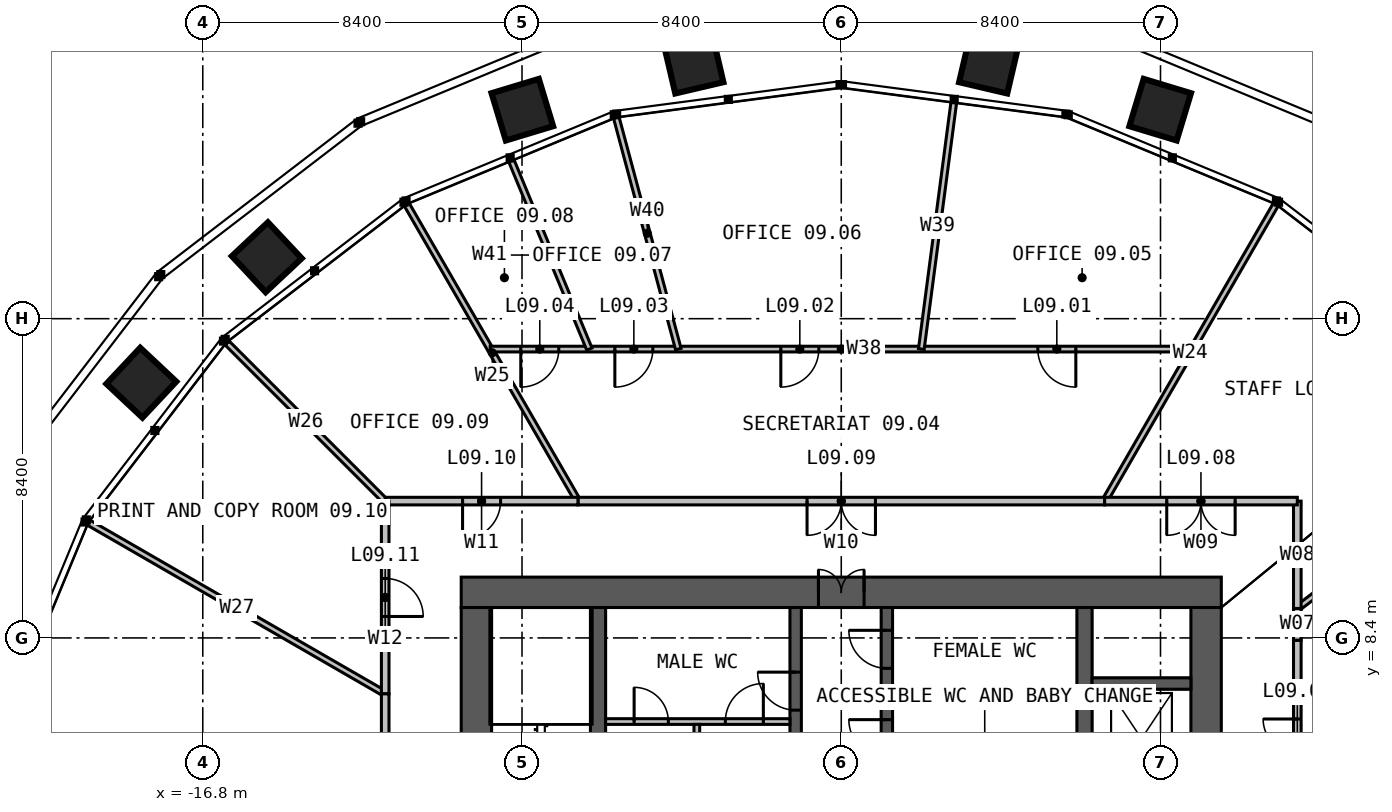
"""IFC4 building model, lengths in metres.
Left out: names, types, materials, properties, quantities, classifications, styles, units other than length and angle.
Written with IfcOpenShell. Run it as: python <this file> out.ifc"""

import sys

from ifc_helpers import new_model, si_unit, direction, frame, frame_2d, origin, place, context, subcontext, project, spatial, rectangle, extrude, element, fill, save


model = new_model("IFC4")
c1 = context("Model", 3, precision=1e-05, world=origin(), true_north=direction((0.0, 1.0)))
c2 = subcontext(c1, "Body", "Model", "MODEL_VIEW")
j1 = project(units=[si_unit("LENGTHUNIT", "METRE"), si_unit("PLANEANGLEUNIT", "RADIAN")], contexts=[c1])
p1 = place(None, origin())
s1 = spatial("IfcSite", under=j1, at=p1, CompositionType="ELEMENT")
p2 = place(p1, origin())
s2 = spatial("IfcBuilding", under=s1, at=p2, CompositionType="ELEMENT")
p3 = place(p2, frame((0.0, 0.0, 41.0)))
s3 = spatial("IfcBuildingStorey", under=s2, at=p3, CompositionType="ELEMENT", Elevation=41.0)
p4 = place(p3, frame((-10.0, 9.6, 0.0), z_axis=(0.0, 0.0, 1.0), x_axis=(1.0, 0.0, 0.0)))
e1 = element("IfcWall", 1, at=p4, inside=s3, PredefinedType="SOLIDWALL", context=c2, shape_type="SweptSolid", body=[
    extrude(rectangle(XDim=20.0, YDim=0.8, at=frame_2d((10.0, 0.0))), origin(), (0.0, 0.0, 1.0), 4.0),
])
p5 = place(p4, frame((9.4, 0.0, 0.0)))
e2 = element("IfcOpeningElement", 2, at=p5, cuts=e1, PredefinedType="OPENING", context=c2, shape_type="SweptSolid", body=[
    extrude(rectangle(XDim=1.2, YDim=2.2, at=frame_2d((0.6, 1.1))), frame((0.0, 0.41, 0.0), z_axis=(0.0, -1.0, 0.0), x_axis=(1.0, 0.0, 0.0)), (0.0, 0.0, 1.0), 0.82),
])
for number, where, z_axis, x_axis in (
    (3, (9.6, -9.2, 0.0), (0.0, 0.0, 1.0), (0.0, 1.0, 0.0)),
    (4, (-9.6, 9.2, 0.0), (0.0, 0.0, 1.0), (0.0, -1.0, 0.0)),
):
    element("IfcWall", number, at=place(p3, frame(where, z_axis=z_axis, x_axis=x_axis)), inside=s3, PredefinedType="SOLIDWALL", context=c2, shape_type="SweptSolid", body=[
        extrude(rectangle(XDim=18.4, YDim=0.8, at=frame_2d((9.2, 0.0))), origin(), (0.0, 0.0, 1.0), 4.0),
    ])
p6 = place(p3, frame((-6.4, -9.2, 0.0), z_axis=(0.0, 0.0, 1.0), x_axis=(0.0, 1.0, 0.0)))
e5 = element("IfcWall", 5, at=p6, inside=s3, PredefinedType="SOLIDWALL", context=c2, shape_type="SweptSolid", body=[
    extrude(rectangle(XDim=18.4, YDim=0.4, at=frame_2d((9.2, 0.0))), origin(), (0.0, 0.0, 1.0), 4.0),
])
p7 = place(p6, frame((8.7, 0.0, 0.0)))
e6 = element("IfcOpeningElement", 6, at=p7, cuts=e5, PredefinedType="OPENING", context=c2, shape_type="SweptSolid", body=[
    extrude(rectangle(XDim=1.0, YDim=2.2, at=frame_2d((0.5, 1.1))), frame((0.0, 0.21, 0.0), z_axis=(0.0, -1.0, 0.0), x_axis=(1.0, 0.0, 0.0)), (0.0, 0.0, 1.0), 0.42),
])
p8 = place(p3, frame((6.4, 9.2, 0.0), z_axis=(0.0, 0.0, 1.0), x_axis=(0.0, -1.0, 0.0)))
e7 = element("IfcWall", 7, at=p8, inside=s3, PredefinedType="SOLIDWALL", context=c2, shape_type="SweptSolid", body=[
    extrude(rectangle(XDim=18.4, YDim=0.4, at=frame_2d((9.2, 0.0))), origin(), (0.0, 0.0, 1.0), 4.0),
])
p9 = place(p8, frame((8.7, 0.0, 0.0)))
e8 = element("IfcOpeningElement", 8, at=p9, cuts=e7, PredefinedType="OPENING", context=c2, shape_type="SweptSolid", body=[
    extrude(rectangle(XDim=1.0, YDim=2.2, at=frame_2d((0.5, 1.1))), frame((0.0, 0.21, 0.0), z_axis=(0.0, -1.0, 0.0), x_axis=(1.0, 0.0, 0.0)), (0.0, 0.0, 1.0), 0.42),
])
p10 = place(p3, frame((-1.2, 1.45, 0.0), z_axis=(0.0, 0.0, 1.0), x_axis=(0.0, 1.0, 0.0)))
e9 = element("IfcWall", 9, at=p10, inside=s3, PredefinedType="SOLIDWALL", context=c2, shape_type="SweptSolid", body=[
    extrude(rectangle(XDim=7.75, YDim=0.3, at=frame_2d((3.875, 0.0))), origin(), (0.0, 0.0, 1.0), 4.0),
])
p11 = place(p10, frame((5.05, 0.0, 0.0)))
e10 = element("IfcOpeningElement", 10, at=p11, cuts=e9, PredefinedType="OPENING", context=c2, shape_type="SweptSolid", body=[
    extrude(rectangle(XDim=1.0, YDim=2.2, at=frame_2d((0.5, 1.1))), frame((0.0, 0.16, 0.0), z_axis=(0.0, -1.0, 0.0), x_axis=(1.0, 0.0, 0.0)), (0.0, 0.0, 1.0), 0.32),
])
p12 = place(p3, frame((1.2, 1.45, 0.0), z_axis=(0.0, 0.0, 1.0), x_axis=(0.0, 1.0, 0.0)))
e11 = element("IfcWall", 11, at=p12, inside=s3, PredefinedType="SOLIDWALL", context=c2, shape_type="SweptSolid", body=[
    extrude(rectangle(XDim=7.75, YDim=0.3, at=frame_2d((3.875, 0.0))), origin(), (0.0, 0.0, 1.0), 4.0),
])
p13 = place(p12, frame((3.8, 0.0, 0.0)))
e12 = element("IfcOpeningElement", 12, at=p13, cuts=e11, PredefinedType="OPENING", context=c2, shape_type="SweptSolid", body=[
    extrude(rectangle(XDim=1.0, YDim=2.2, at=frame_2d((0.5, 1.1))), frame((0.0, 0.16, 0.0), z_axis=(0.0, -1.0, 0.0), x_axis=(1.0, 0.0, 0.0)), (0.0, 0.0, 1.0), 0.32),
])
p14 = place(p12, frame((6.15, 0.0, 0.0)))
e13 = element("IfcOpeningElement", 13, at=p14, cuts=e11, PredefinedType="OPENING", context=c2, shape_type="SweptSolid", body=[
    extrude(rectangle(XDim=1.0, YDim=2.2, at=frame_2d((0.5, 1.1))), frame((0.0, 0.16, 0.0), z_axis=(0.0, -1.0, 0.0), x_axis=(1.0, 0.0, 0.0)), (0.0, 0.0, 1.0), 0.32),
])
p15 = place(p3, frame((6.6, 7.2, 0.0), z_axis=(0.0, 0.0, 1.0), x_axis=(1.0, 0.0, 0.0)))
e14 = element("IfcWall", 14, at=p15, inside=s3, PredefinedType="SOLIDWALL", context=c2, shape_type="SweptSolid", body=[
    extrude(rectangle(XDim=2.6, YDim=0.3, at=frame_2d((1.3, 0.0))), origin(), (0.0, 0.0, 1.0), 4.0),
])
p16 = place(p3, frame((1.35, 6.8, 0.0), z_axis=(0.0, 0.0, 1.0), x_axis=(1.0, 0.0, 0.0)))
e15 = element("IfcWall", 15, at=p16, inside=s3, PredefinedType="PARTITIONING", context=c2, shape_type="SweptSolid", body=[
    extrude(rectangle(XDim=4.85, YDim=0.15, at=frame_2d((2.425, 0.0))), origin(), (0.0, 0.0, 1.0), 3.75),
])
p17 = place(p3, frame((-6.2, 6.2, 0.0), z_axis=(0.0, 0.0, 1.0), x_axis=(1.0, 0.0, 0.0)))
e16 = element("IfcWall", 16, at=p17, inside=s3, PredefinedType="PARTITIONING", context=c2, shape_type="SweptSolid", body=[
    extrude(rectangle(XDim=4.85, YDim=0.15, at=frame_2d((2.425, 0.0))), origin(), (0.0, 0.0, 1.0), 3.75),
])
p18 = place(p17, frame((3.15, 0.0, 0.0)))
e17 = element("IfcOpeningElement", 17, at=p18, cuts=e16, PredefinedType="OPENING", context=c2, shape_type="SweptSolid", body=[
    extrude(rectangle(XDim=1.0, YDim=2.2, at=frame_2d((0.5, 1.1))), frame((0.0, 0.085, 0.0), z_axis=(0.0, -1.0, 0.0), x_axis=(1.0, 0.0, 0.0)), (0.0, 0.0, 1.0), 0.17),
])
p19 = place(p17, frame((0.75, 0.0, 0.0)))
e18 = element("IfcOpeningElement", 18, at=p19, cuts=e16, PredefinedType="OPENING", context=c2, shape_type="SweptSolid", body=[
    extrude(rectangle(XDim=0.9, YDim=2.2, at=frame_2d((0.45, 1.1))), frame((0.0, 0.085, 0.0), z_axis=(0.0, -1.0, 0.0), x_axis=(1.0, 0.0, 0.0)), (0.0, 0.0, 1.0), 0.17),
])
p20 = place(p3, frame((-3.8, 4.75, 0.0), z_axis=(0.0, 0.0, 1.0), x_axis=(0.0, 1.0, 0.0)))
e19 = element("IfcWall", 19, at=p20, inside=s3, PredefinedType="PARTITIONING", context=c2, shape_type="SweptSolid", body=[
    extrude(rectangle(XDim=1.375, YDim=0.15, at=frame_2d((0.688, 0.0))), origin(), (0.0, 0.0, 1.0), 3.75),
])
p21 = place(p3, frame((12.0, 9.175, 0.0), z_axis=(0.0, 0.0, 1.0), x_axis=(0.794391707198, 0.607405807952, 0.0)))
e20 = element("IfcWall", 20, at=p21, inside=s3, PredefinedType="PARTITIONING", context=c2, shape_type="SweptSolid", body=[
    extrude(rectangle(XDim=7.569, YDim=0.15, at=frame_2d((3.784, 0.0))), origin(), (0.0, 0.0, 1.0), 2.79),
])
for number, where, z_axis, x_axis in (
    (21, (6.928, 12.0, 0.0), (0.0, 0.0, 1.0), (0.5, 0.866, 0.0)),
    (22, (-6.928, 12.0, 0.0), (0.0, 0.0, 1.0), (-0.5, 0.866, 0.0)),
):
    element("IfcWall", number, at=place(p3, frame(where, z_axis=z_axis, x_axis=x_axis)), inside=s3, PredefinedType="PARTITIONING", context=c2, shape_type="SweptSolid", body=[
        extrude(rectangle(XDim=9.014, YDim=0.15, at=frame_2d((4.507, 0.0))), origin(), (0.0, 0.0, 1.0), 2.79),
    ])
p22 = place(p3, frame((-12.0, 12.0, 0.0), z_axis=(0.0, 0.0, 1.0), x_axis=(-0.707106781187, 0.707106781187, 0.0)))
e23 = element("IfcWall", 23, at=p22, inside=s3, PredefinedType="PARTITIONING", context=c2, shape_type="SweptSolid", body=[
    extrude(rectangle(XDim=5.9, YDim=0.15, at=frame_2d((2.95, 0.0))), origin(), (0.0, 0.0, 1.0), 2.79),
])
p23 = place(p3, frame((-12.0, 6.928, 0.0), z_axis=(0.0, 0.0, 1.0), x_axis=(-0.866027720199, 0.49999598783, 0.0)))
e24 = element("IfcWall", 24, at=p23, inside=s3, PredefinedType="PARTITIONING", context=c2, shape_type="SweptSolid", body=[
    extrude(rectangle(XDim=9.014, YDim=0.15, at=frame_2d((4.507, 0.0))), origin(), (0.0, 0.0, 1.0), 2.79),
])
p24 = place(p3, frame((12.0, 1.559, 0.0), z_axis=(0.0, 0.0, 1.0), x_axis=(0.0, 1.0, 0.0)))
e25 = element("IfcWall", 25, at=p24, inside=s3, PredefinedType="PARTITIONING", context=c2, shape_type="SweptSolid", body=[
    extrude(rectangle(XDim=6.781, YDim=0.2, at=frame_2d((3.391, 0.0))), origin(), (0.0, 0.0, 1.0), 3.2),
])
p25 = place(p24, frame((2.908, 0.0, 0.0)))
e26 = element("IfcOpeningElement", 26, at=p25, cuts=e25, PredefinedType="OPENING", context=c2, shape_type="SweptSolid", body=[
    extrude(rectangle(XDim=1.8, YDim=2.2, at=frame_2d((0.9, 1.1))), frame((0.0, 0.11, 0.0), z_axis=(0.0, -1.0, 0.0), x_axis=(1.0, 0.0, 0.0)), (0.0, 0.0, 1.0), 0.22),
])
p26 = place(p3, frame((12.0, 8.34, 0.0), z_axis=(0.0, 0.0, 1.0), x_axis=(0.0, 1.0, 0.0)))
e27 = element("IfcWall", 27, at=p26, inside=s3, PredefinedType="PARTITIONING", context=c2, shape_type="SweptSolid", body=[
    extrude(rectangle(XDim=0.835, YDim=0.2, at=frame_2d((0.417, 0.0))), origin(), (0.0, 0.0, 1.0), 3.8),
])
p27 = place(p3, frame((12.0, 9.175, 0.0), z_axis=(0.0, 0.0, 1.0), x_axis=(0.0, 1.0, 0.0)))
e28 = element("IfcWall", 28, at=p27, inside=s3, PredefinedType="PARTITIONING", context=c2, shape_type="SweptSolid", body=[
    extrude(rectangle(XDim=2.825, YDim=0.2, at=frame_2d((1.413, 0.0))), origin(), (0.0, 0.0, 1.0), 3.8),
])
p28 = place(p3, frame((12.0, 12.0, 0.0), z_axis=(0.0, 0.0, 1.0), x_axis=(-1.0, 0.0, 0.0)))
e29 = element("IfcWall", 29, at=p28, inside=s3, PredefinedType="PARTITIONING", context=c2, shape_type="SweptSolid", body=[
    extrude(rectangle(XDim=5.072, YDim=0.2, at=frame_2d((2.536, 0.0))), origin(), (0.0, 0.0, 1.0), 3.8),
])
p29 = place(p28, frame((1.636, 0.0, 0.0)))
e30 = element("IfcOpeningElement", 30, at=p29, cuts=e29, PredefinedType="OPENING", context=c2, shape_type="SweptSolid", body=[
    extrude(rectangle(XDim=1.8, YDim=2.2, at=frame_2d((0.9, 1.1))), frame((0.0, 0.11, 0.0), z_axis=(0.0, -1.0, 0.0), x_axis=(1.0, 0.0, 0.0)), (0.0, 0.0, 1.0), 0.22),
])
p30 = place(p3, frame((9.238, 16.0, 0.0), z_axis=(0.0, 0.0, 1.0), x_axis=(-1.0, 0.0, 0.0)))
e31 = element("IfcWall", 31, at=p30, inside=s3, PredefinedType="PARTITIONING", context=c2, shape_type="SweptSolid", body=[
    extrude(rectangle(XDim=18.475, YDim=0.15, at=frame_2d((9.238, 0.0))), origin(), (0.0, 0.0, 1.0), 2.79),
])
p31 = place(p30, frame((3.066, 0.0, 0.0)))
e32 = element("IfcOpeningElement", 32, at=p31, cuts=e31, PredefinedType="OPENING", context=c2, shape_type="SweptSolid", body=[
    extrude(rectangle(XDim=1.0, YDim=2.2, at=frame_2d((0.5, 1.1))), frame((0.0, 0.085, 0.0), z_axis=(0.0, -1.0, 0.0), x_axis=(1.0, 0.0, 0.0)), (0.0, 0.0, 1.0), 0.17),
])
p32 = place(p30, frame((9.828, 0.0, 0.0)))
e33 = element("IfcOpeningElement", 33, at=p32, cuts=e31, PredefinedType="OPENING", context=c2, shape_type="SweptSolid", body=[
    extrude(rectangle(XDim=1.0, YDim=2.2, at=frame_2d((0.5, 1.1))), frame((0.0, 0.085, 0.0), z_axis=(0.0, -1.0, 0.0), x_axis=(1.0, 0.0, 0.0)), (0.0, 0.0, 1.0), 0.17),
])
p33 = place(p30, frame((14.195, 0.0, 0.0)))
e34 = element("IfcOpeningElement", 34, at=p33, cuts=e31, PredefinedType="OPENING", context=c2, shape_type="SweptSolid", body=[
    extrude(rectangle(XDim=1.0, YDim=2.2, at=frame_2d((0.5, 1.1))), frame((0.0, 0.085, 0.0), z_axis=(0.0, -1.0, 0.0), x_axis=(1.0, 0.0, 0.0)), (0.0, 0.0, 1.0), 0.17),
])
p34 = place(p30, frame((16.67, 0.0, 0.0)))
e35 = element("IfcOpeningElement", 35, at=p34, cuts=e31, PredefinedType="OPENING", context=c2, shape_type="SweptSolid", body=[
    extrude(rectangle(XDim=1.0, YDim=2.2, at=frame_2d((0.5, 1.1))), frame((0.0, 0.085, 0.0), z_axis=(0.0, -1.0, 0.0), x_axis=(1.0, 0.0, 0.0)), (0.0, 0.0, 1.0), 0.17),
])
p35 = place(p3, frame((2.106, 16.0, 0.0), z_axis=(0.0, 0.0, 1.0), x_axis=(0.130541469286, 0.99144284999, 0.0)))
e36 = element("IfcWall", 36, at=p35, inside=s3, PredefinedType="PARTITIONING", context=c2, shape_type="SweptSolid", body=[
    extrude(rectangle(XDim=6.536, YDim=0.15, at=frame_2d((3.268, 0.0))), origin(), (0.0, 0.0, 1.0), 2.79),
])
p36 = place(p3, frame((-4.287, 16.0, 0.0), z_axis=(0.0, 0.0, 1.0), x_axis=(-0.258826398016, 0.965923856052, 0.0)))
e37 = element("IfcWall", 37, at=p36, inside=s3, PredefinedType="PARTITIONING", context=c2, shape_type="SweptSolid", body=[
    extrude(rectangle(XDim=6.306, YDim=0.15, at=frame_2d((3.153, 0.0))), origin(), (0.0, 0.0, 1.0), 2.79),
])
p37 = place(p3, frame((-6.627, 16.0, 0.0), z_axis=(0.0, 0.0, 1.0), x_axis=(-0.382695310359, 0.923874612396, 0.0)))
e38 = element("IfcWall", 38, at=p37, inside=s3, PredefinedType="PARTITIONING", context=c2, shape_type="SweptSolid", body=[
    extrude(rectangle(XDim=5.356, YDim=0.15, at=frame_2d((2.678, 0.0))), origin(), (0.0, 0.0, 1.0), 2.79),
])
p38 = place(p3, frame((6.928, 12.0, 0.0), z_axis=(0.0, 0.0, 1.0), x_axis=(-1.0, 0.0, 0.0)))
e39 = element("IfcWall", 39, at=p38, inside=s3, PredefinedType="PARTITIONING", context=c2, shape_type="SweptSolid", body=[
    extrude(rectangle(XDim=13.856, YDim=0.2, at=frame_2d((6.928, 0.0))), origin(), (0.0, 0.0, 1.0), 3.8),
])
p39 = place(p38, frame((6.028, 0.0, 0.0)))
e40 = element("IfcOpeningElement", 40, at=p39, cuts=e39, PredefinedType="OPENING", context=c2, shape_type="SweptSolid", body=[
    extrude(rectangle(XDim=1.8, YDim=2.2, at=frame_2d((0.9, 1.1))), frame((0.0, 0.11, 0.0), z_axis=(0.0, -1.0, 0.0), x_axis=(1.0, 0.0, 0.0)), (0.0, 0.0, 1.0), 0.22),
])
p40 = place(p3, frame((-6.928, 12.0, 0.0), z_axis=(0.0, 0.0, 1.0), x_axis=(-1.0, 0.0, 0.0)))
e41 = element("IfcWall", 41, at=p40, inside=s3, PredefinedType="PARTITIONING", context=c2, shape_type="SweptSolid", body=[
    extrude(rectangle(XDim=5.072, YDim=0.2, at=frame_2d((2.536, 0.0))), origin(), (0.0, 0.0, 1.0), 3.8),
])
p41 = place(p40, frame((2.036, 0.0, 0.0)))
e42 = element("IfcOpeningElement", 42, at=p41, cuts=e41, PredefinedType="OPENING", context=c2, shape_type="SweptSolid", body=[
    extrude(rectangle(XDim=1.0, YDim=2.2, at=frame_2d((0.5, 1.1))), frame((0.0, 0.11, 0.0), z_axis=(0.0, -1.0, 0.0), x_axis=(1.0, 0.0, 0.0)), (0.0, 0.0, 1.0), 0.22),
])
p42 = place(p3, frame((-12.0, 12.0, 0.0), z_axis=(0.0, 0.0, 1.0), x_axis=(0.0, -1.0, 0.0)))
e43 = element("IfcWall", 43, at=p42, inside=s3, PredefinedType="PARTITIONING", context=c2, shape_type="SweptSolid", body=[
    extrude(rectangle(XDim=5.072, YDim=0.2, at=frame_2d((2.536, 0.0))), origin(), (0.0, 0.0, 1.0), 3.8),
])
p43 = place(p42, frame((2.036, 0.0, 0.0)))
e44 = element("IfcOpeningElement", 44, at=p43, cuts=e43, PredefinedType="OPENING", context=c2, shape_type="SweptSolid", body=[
    extrude(rectangle(XDim=1.0, YDim=2.2, at=frame_2d((0.5, 1.1))), frame((0.0, 0.11, 0.0), z_axis=(0.0, -1.0, 0.0), x_axis=(1.0, 0.0, 0.0)), (0.0, 0.0, 1.0), 0.22),
])
p44 = place(p3, frame((-12.0, 6.928, 0.0), z_axis=(0.0, 0.0, 1.0), x_axis=(0.0, -1.0, 0.0)))
e45 = element("IfcWall", 45, at=p44, inside=s3, PredefinedType="PARTITIONING", context=c2, shape_type="SweptSolid", body=[
    extrude(rectangle(XDim=6.928, YDim=0.2, at=frame_2d((3.464, 0.0))), origin(), (0.0, 0.0, 1.0), 3.8),
])
p45 = place(p44, frame((2.564, 0.0, 0.0)))
e46 = element("IfcOpeningElement", 46, at=p45, cuts=e45, PredefinedType="OPENING", context=c2, shape_type="SweptSolid", body=[
    extrude(rectangle(XDim=1.8, YDim=2.2, at=frame_2d((0.9, 1.1))), frame((0.0, 0.11, 0.0), z_axis=(0.0, -1.0, 0.0), x_axis=(1.0, 0.0, 0.0)), (0.0, 0.0, 1.0), 0.22),
])
p46 = place(p5, origin())
e47 = element("IfcDoor", 47, at=p46, inside=s3, OperationType="DOUBLE_DOOR_SINGLE_SWING", PredefinedType="DOOR", context=c2, shape_type="SweptSolid", body=[
    extrude(rectangle(XDim=1.2, YDim=2.2, at=frame_2d((0.6, 1.1))), frame((0.0, 0.025, 0.0), z_axis=(0.0, -1.0, 0.0), x_axis=(1.0, 0.0, 0.0)), (0.0, 0.0, 1.0), 0.05),
])
fill(e2, e47)
p47 = place(p11, origin())
e48 = element("IfcDoor", 48, at=p47, inside=s3, OperationType="SINGLE_SWING_RIGHT", PredefinedType="DOOR", context=c2, shape_type="SweptSolid", body=[
    extrude(rectangle(XDim=1.0, YDim=2.2, at=frame_2d((0.5, 1.1))), frame((0.0, 0.025, 0.0), z_axis=(0.0, -1.0, 0.0), x_axis=(1.0, 0.0, 0.0)), (0.0, 0.0, 1.0), 0.05),
])
fill(e10, e48)
p48 = place(p13, origin())
e49 = element("IfcDoor", 49, at=p48, inside=s3, OperationType="SINGLE_SWING_RIGHT", PredefinedType="DOOR", context=c2, shape_type="SweptSolid", body=[
    extrude(rectangle(XDim=1.0, YDim=2.2, at=frame_2d((0.5, 1.1))), frame((0.0, 0.025, 0.0), z_axis=(0.0, -1.0, 0.0), x_axis=(1.0, 0.0, 0.0)), (0.0, 0.0, 1.0), 0.05),
])
fill(e12, e49)
p49 = place(p14, origin())
e50 = element("IfcDoor", 50, at=p49, inside=s3, OperationType="SINGLE_SWING_RIGHT", PredefinedType="DOOR", context=c2, shape_type="SweptSolid", body=[
    extrude(rectangle(XDim=1.0, YDim=2.2, at=frame_2d((0.5, 1.1))), frame((0.0, 0.025, 0.0), z_axis=(0.0, -1.0, 0.0), x_axis=(1.0, 0.0, 0.0)), (0.0, 0.0, 1.0), 0.05),
])
fill(e13, e50)
p50 = place(p18, origin())
e51 = element("IfcDoor", 51, at=p50, inside=s3, OperationType="SINGLE_SWING_RIGHT", PredefinedType="DOOR", context=c2, shape_type="SweptSolid", body=[
    extrude(rectangle(XDim=1.0, YDim=2.2, at=frame_2d((0.5, 1.1))), frame((0.0, 0.025, 0.0), z_axis=(0.0, -1.0, 0.0), x_axis=(1.0, 0.0, 0.0)), (0.0, 0.0, 1.0), 0.05),
])
fill(e17, e51)
p51 = place(p19, origin())
e52 = element("IfcDoor", 52, at=p51, inside=s3, OperationType="SINGLE_SWING_LEFT", PredefinedType="DOOR", context=c2, shape_type="SweptSolid", body=[
    extrude(rectangle(XDim=0.9, YDim=2.2, at=frame_2d((0.45, 1.1))), frame((0.0, 0.025, 0.0), z_axis=(0.0, -1.0, 0.0), x_axis=(1.0, 0.0, 0.0)), (0.0, 0.0, 1.0), 0.05),
])
fill(e18, e52)
p52 = place(p25, origin())
e53 = element("IfcDoor", 53, at=p52, inside=s3, OperationType="DOUBLE_DOOR_SINGLE_SWING", PredefinedType="DOOR", context=c2, shape_type="SweptSolid", body=[
    extrude(rectangle(XDim=1.8, YDim=2.2, at=frame_2d((0.9, 1.1))), frame((0.0, 0.025, 0.0), z_axis=(0.0, -1.0, 0.0), x_axis=(1.0, 0.0, 0.0)), (0.0, 0.0, 1.0), 0.05),
])
fill(e26, e53)
p53 = place(p29, origin())
e54 = element("IfcDoor", 54, at=p53, inside=s3, OperationType="DOUBLE_DOOR_SINGLE_SWING", PredefinedType="DOOR", context=c2, shape_type="SweptSolid", body=[
    extrude(rectangle(XDim=1.8, YDim=2.2, at=frame_2d((0.9, 1.1))), frame((0.0, 0.025, 0.0), z_axis=(0.0, -1.0, 0.0), x_axis=(1.0, 0.0, 0.0)), (0.0, 0.0, 1.0), 0.05),
])
fill(e30, e54)
p54 = place(p31, origin())
e55 = element("IfcDoor", 55, at=p54, inside=s3, OperationType="SINGLE_SWING_LEFT", PredefinedType="DOOR", context=c2, shape_type="SweptSolid", body=[
    extrude(rectangle(XDim=1.0, YDim=2.2, at=frame_2d((0.5, 1.1))), frame((0.0, 0.025, 0.0), z_axis=(0.0, -1.0, 0.0), x_axis=(1.0, 0.0, 0.0)), (0.0, 0.0, 1.0), 0.05),
])
fill(e32, e55)
p55 = place(p32, origin())
e56 = element("IfcDoor", 56, at=p55, inside=s3, OperationType="SINGLE_SWING_RIGHT", PredefinedType="DOOR", context=c2, shape_type="SweptSolid", body=[
    extrude(rectangle(XDim=1.0, YDim=2.2, at=frame_2d((0.5, 1.1))), frame((0.0, 0.025, 0.0), z_axis=(0.0, -1.0, 0.0), x_axis=(1.0, 0.0, 0.0)), (0.0, 0.0, 1.0), 0.05),
])
fill(e33, e56)
p56 = place(p33, origin())
e57 = element("IfcDoor", 57, at=p56, inside=s3, OperationType="SINGLE_SWING_RIGHT", PredefinedType="DOOR", context=c2, shape_type="SweptSolid", body=[
    extrude(rectangle(XDim=1.0, YDim=2.2, at=frame_2d((0.5, 1.1))), frame((0.0, 0.025, 0.0), z_axis=(0.0, -1.0, 0.0), x_axis=(1.0, 0.0, 0.0)), (0.0, 0.0, 1.0), 0.05),
])
fill(e34, e57)
p57 = place(p34, origin())
e58 = element("IfcDoor", 58, at=p57, inside=s3, OperationType="SINGLE_SWING_RIGHT", PredefinedType="DOOR", context=c2, shape_type="SweptSolid", body=[
    extrude(rectangle(XDim=1.0, YDim=2.2, at=frame_2d((0.5, 1.1))), frame((0.0, 0.025, 0.0), z_axis=(0.0, -1.0, 0.0), x_axis=(1.0, 0.0, 0.0)), (0.0, 0.0, 1.0), 0.05),
])
fill(e35, e58)
p58 = place(p39, origin())
e59 = element("IfcDoor", 59, at=p58, inside=s3, OperationType="DOUBLE_DOOR_SINGLE_SWING", PredefinedType="DOOR", context=c2, shape_type="SweptSolid", body=[
    extrude(rectangle(XDim=1.8, YDim=2.2, at=frame_2d((0.9, 1.1))), frame((0.0, 0.025, 0.0), z_axis=(0.0, -1.0, 0.0), x_axis=(1.0, 0.0, 0.0)), (0.0, 0.0, 1.0), 0.05),
])
fill(e40, e59)
p59 = place(p41, origin())
e60 = element("IfcDoor", 60, at=p59, inside=s3, OperationType="SINGLE_SWING_RIGHT", PredefinedType="DOOR", context=c2, shape_type="SweptSolid", body=[
    extrude(rectangle(XDim=1.0, YDim=2.2, at=frame_2d((0.5, 1.1))), frame((0.0, 0.025, 0.0), z_axis=(0.0, -1.0, 0.0), x_axis=(1.0, 0.0, 0.0)), (0.0, 0.0, 1.0), 0.05),
])
fill(e42, e60)
p60 = place(p43, origin())
e61 = element("IfcDoor", 61, at=p60, inside=s3, OperationType="SINGLE_SWING_RIGHT", PredefinedType="DOOR", context=c2, shape_type="SweptSolid", body=[
    extrude(rectangle(XDim=1.0, YDim=2.2, at=frame_2d((0.5, 1.1))), frame((0.0, 0.025, 0.0), z_axis=(0.0, -1.0, 0.0), x_axis=(1.0, 0.0, 0.0)), (0.0, 0.0, 1.0), 0.05),
])
fill(e44, e61)
save(model, sys.argv[1])
